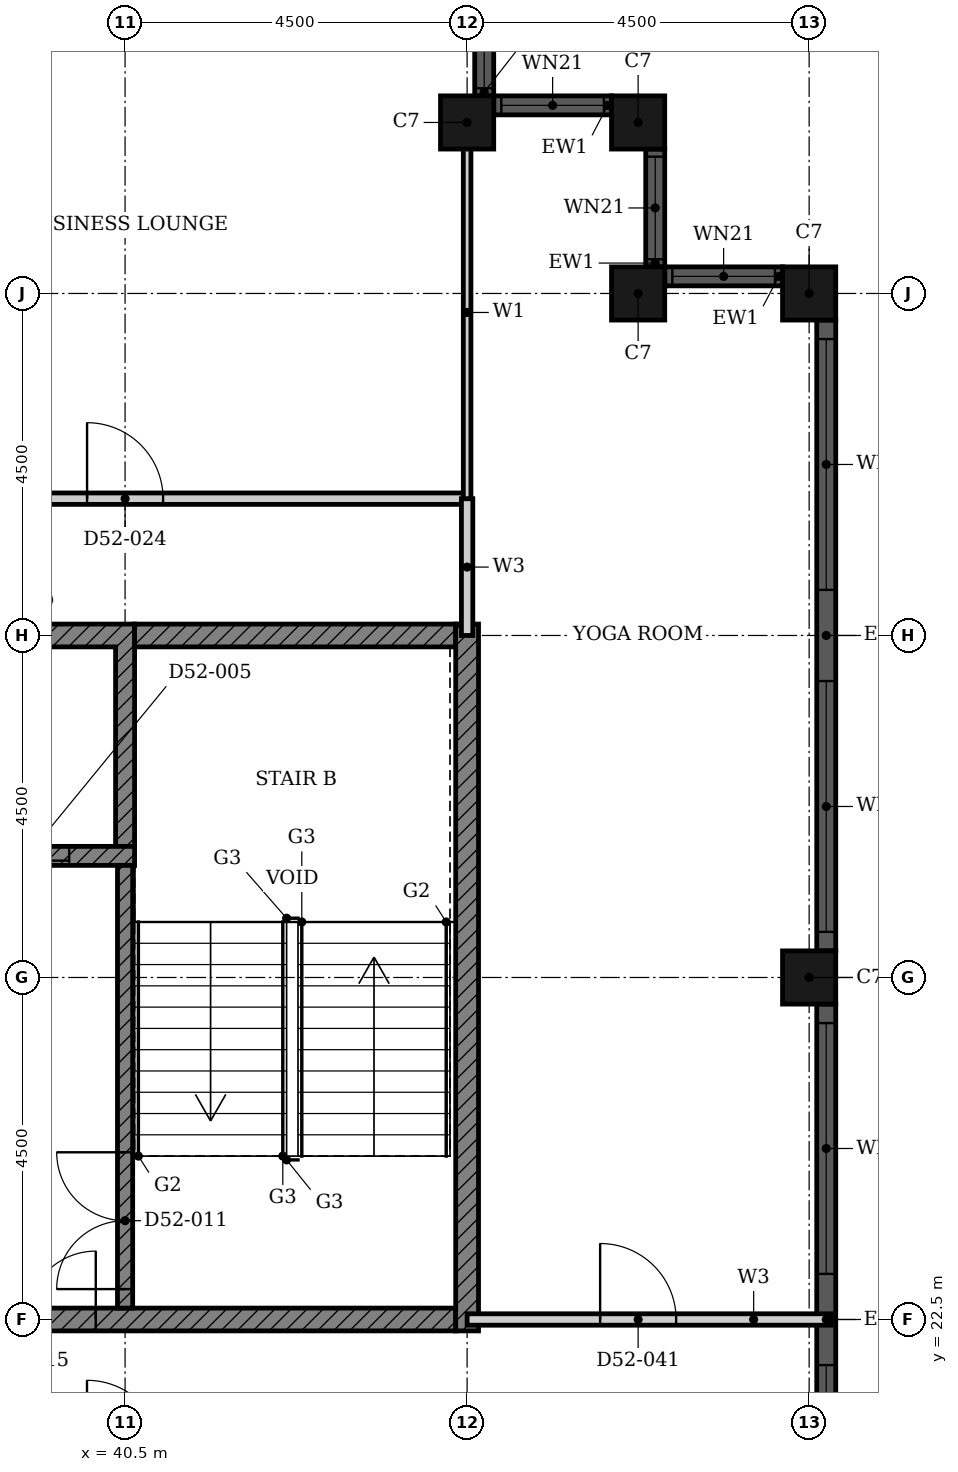
"""IFC4 building model, lengths in metres.
Left out: names, types, materials, properties, quantities, classifications, styles, units other than length and angle.
Written with IfcOpenShell. Run it as: python <this file> out.ifc"""

import sys

from ifc_helpers import new_model, si_unit, direction, frame, frame_2d, origin, origin_2d, place, context, subcontext, project, spatial, polyline, rectangle, hollow_rectangle, outline, extrude, element, fill, save


model = new_model("IFC4")
c1 = context("Model", 3, precision=1e-05, world=origin(), true_north=direction((0.0, 1.0)))
c2 = subcontext(c1, "Body", "Model", "MODEL_VIEW")
j1 = project(units=[si_unit("LENGTHUNIT", "METRE"), si_unit("PLANEANGLEUNIT", "RADIAN")], contexts=[c1])
p1 = place(None, origin())
s1 = spatial("IfcSite", under=j1, at=p1, CompositionType="ELEMENT")
p2 = place(p1, origin())
s2 = spatial("IfcBuilding", under=s1, at=p2, CompositionType="ELEMENT")
p3 = place(p2, frame((0.0, 0.0, 207.2)))
s3 = spatial("IfcBuildingStorey", under=s2, at=p3, CompositionType="ELEMENT", Elevation=207.2)
for number, where, z_axis, x_axis in (
    (1, (49.5, 27.0, 0.0), (0.0, 0.0, 1.0), (1.0, 0.0, 0.0)),
    (2, (49.5, 36.0, 0.0), (0.0, 0.0, 1.0), (1.0, 0.0, 0.0)),
    (3, (47.25, 36.0, 0.0), (0.0, 0.0, 1.0), (1.0, 0.0, 0.0)),
    (4, (47.25, 38.25, 0.0), (0.0, 0.0, 1.0), (1.0, 0.0, 0.0)),
    (5, (45.0, 38.25, 0.0), (0.0, 0.0, 1.0), (1.0, 0.0, 0.0)),
):
    element("IfcColumn", number, at=place(p3, frame(where, z_axis=z_axis, x_axis=x_axis)), inside=s3, PredefinedType="COLUMN", context=c2, shape_type="SweptSolid", body=[
        extrude(hollow_rectangle(XDim=0.7, YDim=0.7, WallThickness=0.022, at=origin_2d()), origin(), (0.0, 0.0, 1.0), 3.7),
    ])
p4 = place(p3, frame((49.725, 18.35, 0.0), z_axis=(0.0, 0.0, 1.0), x_axis=(0.0, 1.0, 0.0)))
e6 = element("IfcWall", 6, at=p4, inside=s3, PredefinedType="SOLIDWALL", context=c2, shape_type="SweptSolid", body=[
    extrude(rectangle(XDim=8.3, YDim=0.25, at=frame_2d((4.15, 0.0))), origin(), (0.0, 0.0, 1.0), 3.7),
])
p5 = place(p4, frame((0.25, 0.0, 0.45)))
e7 = element("IfcOpeningElement", 7, at=p5, cuts=e6, PredefinedType="OPENING", context=c2, shape_type="SweptSolid", body=[
    extrude(rectangle(XDim=3.3, YDim=2.3, at=frame_2d((1.65, 1.15))), frame((0.0, 0.135, 0.0), z_axis=(0.0, -1.0, 0.0), x_axis=(1.0, 0.0, 0.0)), (0.0, 0.0, 1.0), 0.27),
])
p6 = place(p4, frame((4.75, 0.0, 0.45)))
e8 = element("IfcOpeningElement", 8, at=p6, cuts=e6, PredefinedType="OPENING", context=c2, shape_type="SweptSolid", body=[
    extrude(rectangle(XDim=3.3, YDim=2.3, at=frame_2d((1.65, 1.15))), frame((0.0, 0.135, 0.0), z_axis=(0.0, -1.0, 0.0), x_axis=(1.0, 0.0, 0.0)), (0.0, 0.0, 1.0), 0.27),
])
p7 = place(p3, frame((49.725, 27.35, 0.0), z_axis=(0.0, 0.0, 1.0), x_axis=(0.0, 1.0, 0.0)))
e9 = element("IfcWall", 9, at=p7, inside=s3, PredefinedType="SOLIDWALL", context=c2, shape_type="SweptSolid", body=[
    extrude(rectangle(XDim=8.3, YDim=0.25, at=frame_2d((4.15, 0.0))), origin(), (0.0, 0.0, 1.0), 3.7),
])
p8 = place(p7, frame((0.25, 0.0, 0.45)))
e10 = element("IfcOpeningElement", 10, at=p8, cuts=e9, PredefinedType="OPENING", context=c2, shape_type="SweptSolid", body=[
    extrude(rectangle(XDim=3.3, YDim=2.3, at=frame_2d((1.65, 1.15))), frame((0.0, 0.135, 0.0), z_axis=(0.0, -1.0, 0.0), x_axis=(1.0, 0.0, 0.0)), (0.0, 0.0, 1.0), 0.27),
])
p9 = place(p7, frame((4.75, 0.0, 0.45)))
e11 = element("IfcOpeningElement", 11, at=p9, cuts=e9, PredefinedType="OPENING", context=c2, shape_type="SweptSolid", body=[
    extrude(rectangle(XDim=3.3, YDim=2.3, at=frame_2d((1.65, 1.15))), frame((0.0, 0.135, 0.0), z_axis=(0.0, -1.0, 0.0), x_axis=(1.0, 0.0, 0.0)), (0.0, 0.0, 1.0), 0.27),
])
p10 = place(p3, frame((49.15, 36.225, 0.0), z_axis=(0.0, 0.0, 1.0), x_axis=(-1.0, 0.0, 0.0)))
e12 = element("IfcWall", 12, at=p10, inside=s3, PredefinedType="SOLIDWALL", context=c2, shape_type="SweptSolid", body=[
    extrude(rectangle(XDim=1.55, YDim=0.25, at=frame_2d((0.775, 0.0))), origin(), (0.0, 0.0, 1.0), 3.7),
])
p11 = place(p10, frame((0.1, 0.0, 0.9)))
e13 = element("IfcOpeningElement", 13, at=p11, cuts=e12, PredefinedType="OPENING", context=c2, shape_type="SweptSolid", body=[
    extrude(rectangle(XDim=1.35, YDim=1.85, at=frame_2d((0.675, 0.925))), frame((0.0, 0.135, 0.0), z_axis=(0.0, -1.0, 0.0), x_axis=(1.0, 0.0, 0.0)), (0.0, 0.0, 1.0), 0.27),
])
p12 = place(p3, frame((47.475, 36.35, 0.0), z_axis=(0.0, 0.0, 1.0), x_axis=(0.0, 1.0, 0.0)))
e14 = element("IfcWall", 14, at=p12, inside=s3, PredefinedType="SOLIDWALL", context=c2, shape_type="SweptSolid", body=[
    extrude(rectangle(XDim=1.55, YDim=0.25, at=frame_2d((0.775, 0.0))), origin(), (0.0, 0.0, 1.0), 3.7),
])
p13 = place(p12, frame((0.1, 0.0, 0.9)))
e15 = element("IfcOpeningElement", 15, at=p13, cuts=e14, PredefinedType="OPENING", context=c2, shape_type="SweptSolid", body=[
    extrude(rectangle(XDim=1.35, YDim=1.85, at=frame_2d((0.675, 0.925))), frame((0.0, 0.135, 0.0), z_axis=(0.0, -1.0, 0.0), x_axis=(1.0, 0.0, 0.0)), (0.0, 0.0, 1.0), 0.27),
])
p14 = place(p3, frame((46.9, 38.475, 0.0), z_axis=(0.0, 0.0, 1.0), x_axis=(-1.0, 0.0, 0.0)))
e16 = element("IfcWall", 16, at=p14, inside=s3, PredefinedType="SOLIDWALL", context=c2, shape_type="SweptSolid", body=[
    extrude(rectangle(XDim=1.55, YDim=0.25, at=frame_2d((0.775, 0.0))), origin(), (0.0, 0.0, 1.0), 3.7),
])
p15 = place(p14, frame((0.1, 0.0, 0.9)))
e17 = element("IfcOpeningElement", 17, at=p15, cuts=e16, PredefinedType="OPENING", context=c2, shape_type="SweptSolid", body=[
    extrude(rectangle(XDim=1.35, YDim=1.85, at=frame_2d((0.675, 0.925))), frame((0.0, 0.135, 0.0), z_axis=(0.0, -1.0, 0.0), x_axis=(1.0, 0.0, 0.0)), (0.0, 0.0, 1.0), 0.27),
])
p16 = place(p3, frame((45.225, 38.6, 0.0), z_axis=(0.0, 0.0, 1.0), x_axis=(0.0, 1.0, 0.0)))
e18 = element("IfcWall", 18, at=p16, inside=s3, PredefinedType="SOLIDWALL", context=c2, shape_type="SweptSolid", body=[
    extrude(rectangle(XDim=1.55, YDim=0.25, at=frame_2d((0.775, 0.0))), origin(), (0.0, 0.0, 1.0), 3.7),
])
p17 = place(p16, frame((0.1, 0.0, 0.9)))
e19 = element("IfcOpeningElement", 19, at=p17, cuts=e18, PredefinedType="OPENING", context=c2, shape_type="SweptSolid", body=[
    extrude(rectangle(XDim=1.35, YDim=1.85, at=frame_2d((0.675, 0.925))), frame((0.0, 0.135, 0.0), z_axis=(0.0, -1.0, 0.0), x_axis=(1.0, 0.0, 0.0)), (0.0, 0.0, 1.0), 0.27),
])
p18 = place(p3, origin())
e20 = element("IfcWall", 20, at=p18, inside=s3, PredefinedType="SHEAR", context=c2, shape_type="SweptSolid", body=[
    extrude(outline(polyline([(35.232, 28.725), (35.482, 28.725), (35.482, 31.35), (37.803, 31.35), (37.803, 28.725), (38.053, 28.725), (38.053, 31.35), (40.375, 31.35), (40.375, 28.725), (40.625, 28.725), (40.625, 31.65), (35.232, 31.65), (35.232, 28.725)])), origin(), (0.0, 0.0, 1.0), 3.4),
])
p19 = place(p3, frame((32.911, 22.5, 0.0), z_axis=(0.0, 0.0, 1.0), x_axis=(1.0, 0.0, 0.0)))
e21 = element("IfcWall", 21, at=p19, inside=s3, PredefinedType="SHEAR", context=c2, shape_type="SweptSolid", body=[
    extrude(rectangle(XDim=11.939, YDim=0.3, at=frame_2d((5.97, 0.0))), origin(), (0.0, 0.0, 1.0), 3.4),
])
p20 = place(p19, frame((5.404, 0.0, 0.0)))
e22 = element("IfcOpeningElement", 22, at=p20, cuts=e21, PredefinedType="OPENING", context=c2, shape_type="SweptSolid", body=[
    extrude(rectangle(XDim=1.8, YDim=2.1, at=frame_2d((0.9, 1.05))), frame((0.0, 0.16, 0.0), z_axis=(0.0, -1.0, 0.0), x_axis=(1.0, 0.0, 0.0)), (0.0, 0.0, 1.0), 0.32),
])
p21 = place(p3, frame((40.625, 31.5, 0.0), z_axis=(0.0, 0.0, 1.0), x_axis=(1.0, 0.0, 0.0)))
e23 = element("IfcWall", 23, at=p21, inside=s3, PredefinedType="SHEAR", context=c2, shape_type="SweptSolid", body=[
    extrude(rectangle(XDim=4.225, YDim=0.3, at=frame_2d((2.113, 0.0))), origin(), (0.0, 0.0, 1.0), 3.4),
])
p22 = place(p3, frame((45.0, 22.35, 0.0), z_axis=(0.0, 0.0, 1.0), x_axis=(0.0, 1.0, 0.0)))
e24 = element("IfcWall", 24, at=p22, inside=s3, PredefinedType="SHEAR", context=c2, shape_type="SweptSolid", body=[
    extrude(rectangle(XDim=9.3, YDim=0.3, at=frame_2d((4.65, 0.0))), origin(), (0.0, 0.0, 1.0), 3.4),
])
p23 = place(p3, frame((24.947, 28.6, 0.0), z_axis=(0.0, 0.0, 1.0), x_axis=(1.0, 0.0, 0.0)))
e25 = element("IfcWall", 25, at=p23, inside=s3, PredefinedType="SHEAR", context=c2, shape_type="SweptSolid", body=[
    extrude(rectangle(XDim=15.678, YDim=0.25, at=frame_2d((7.839, 0.0))), origin(), (0.0, 0.0, 1.0), 3.4),
])
p24 = place(p23, frame((6.004, 0.0, 0.0)))
e26 = element("IfcOpeningElement", 26, at=p24, cuts=e25, PredefinedType="OPENING", context=c2, shape_type="SweptSolid", body=[
    extrude(rectangle(XDim=1.1, YDim=2.1, at=frame_2d((0.55, 1.05))), frame((0.0, 0.135, 0.0), z_axis=(0.0, -1.0, 0.0), x_axis=(1.0, 0.0, 0.0)), (0.0, 0.0, 1.0), 0.27),
])
p25 = place(p23, frame((11.146, 0.0, 0.0)))
e27 = element("IfcOpeningElement", 27, at=p25, cuts=e25, PredefinedType="OPENING", context=c2, shape_type="SweptSolid", body=[
    extrude(rectangle(XDim=1.1, YDim=2.1, at=frame_2d((0.55, 1.05))), frame((0.0, 0.135, 0.0), z_axis=(0.0, -1.0, 0.0), x_axis=(1.0, 0.0, 0.0)), (0.0, 0.0, 1.0), 0.27),
])
p26 = place(p23, frame((13.718, 0.0, 0.0)))
e28 = element("IfcOpeningElement", 28, at=p26, cuts=e25, PredefinedType="OPENING", context=c2, shape_type="SweptSolid", body=[
    extrude(rectangle(XDim=1.1, YDim=2.1, at=frame_2d((0.55, 1.05))), frame((0.0, 0.135, 0.0), z_axis=(0.0, -1.0, 0.0), x_axis=(1.0, 0.0, 0.0)), (0.0, 0.0, 1.0), 0.27),
])
p27 = place(p23, frame((0.961, 0.0, 0.0)))
e29 = element("IfcOpeningElement", 29, at=p27, cuts=e25, PredefinedType="OPENING", context=c2, shape_type="SweptSolid", body=[
    extrude(rectangle(XDim=0.9, YDim=2.1, at=frame_2d((0.45, 1.05))), frame((0.0, 0.135, 0.0), z_axis=(0.0, -1.0, 0.0), x_axis=(1.0, 0.0, 0.0)), (0.0, 0.0, 1.0), 0.27),
])
p28 = place(p23, frame((8.675, 0.0, 0.0)))
e30 = element("IfcOpeningElement", 30, at=p28, cuts=e25, PredefinedType="OPENING", context=c2, shape_type="SweptSolid", body=[
    extrude(rectangle(XDim=0.9, YDim=2.1, at=frame_2d((0.45, 1.05))), frame((0.0, 0.135, 0.0), z_axis=(0.0, -1.0, 0.0), x_axis=(1.0, 0.0, 0.0)), (0.0, 0.0, 1.0), 0.27),
])
p29 = place(p3, frame((40.5, 22.65, 0.0), z_axis=(0.0, 0.0, 1.0), x_axis=(0.0, 1.0, 0.0)))
e31 = element("IfcWall", 31, at=p29, inside=s3, PredefinedType="SHEAR", context=c2, shape_type="SweptSolid", body=[
    extrude(rectangle(XDim=5.825, YDim=0.2, at=frame_2d((2.913, 0.0))), origin(), (0.0, 0.0, 1.0), 3.4),
])
p30 = place(p29, frame((0.25, 0.0, 0.0)))
e32 = element("IfcOpeningElement", 32, at=p30, cuts=e31, PredefinedType="OPENING", context=c2, shape_type="SweptSolid", body=[
    extrude(rectangle(XDim=1.8, YDim=2.1, at=frame_2d((0.9, 1.05))), frame((0.0, 0.11, 0.0), z_axis=(0.0, -1.0, 0.0), x_axis=(1.0, 0.0, 0.0)), (0.0, 0.0, 1.0), 0.22),
])
p31 = place(p3, frame((45.0, 22.5, 0.0), z_axis=(0.0, 0.0, 1.0), x_axis=(1.0, 0.0, 0.0)))
e33 = element("IfcWall", 33, at=p31, inside=s3, PredefinedType="PARTITIONING", context=c2, shape_type="SweptSolid", body=[
    extrude(rectangle(XDim=4.79, YDim=0.15, at=frame_2d((2.395, 0.0))), origin(), (0.0, 0.0, 1.0), 3.4),
])
p32 = place(p31, frame((1.75, 0.0, 0.0)))
e34 = element("IfcOpeningElement", 34, at=p32, cuts=e33, PredefinedType="OPENING", context=c2, shape_type="SweptSolid", body=[
    extrude(rectangle(XDim=1.0, YDim=2.1, at=frame_2d((0.5, 1.05))), frame((0.0, 0.085, 0.0), z_axis=(0.0, -1.0, 0.0), x_axis=(1.0, 0.0, 0.0)), (0.0, 0.0, 1.0), 0.17),
])
p33 = place(p3, frame((36.0, 33.3, 0.0), z_axis=(0.0, 0.0, 1.0), x_axis=(1.0, 0.0, 0.0)))
e35 = element("IfcWall", 35, at=p33, inside=s3, PredefinedType="PARTITIONING", context=c2, shape_type="SweptSolid", body=[
    extrude(rectangle(XDim=9.0, YDim=0.15, at=frame_2d((4.5, 0.0))), origin(), (0.0, 0.0, 1.0), 3.4),
])
p34 = place(p33, frame((4.0, 0.0, 0.0)))
e36 = element("IfcOpeningElement", 36, at=p34, cuts=e35, PredefinedType="OPENING", context=c2, shape_type="SweptSolid", body=[
    extrude(rectangle(XDim=1.0, YDim=2.1, at=frame_2d((0.5, 1.05))), frame((0.0, 0.085, 0.0), z_axis=(0.0, -1.0, 0.0), x_axis=(1.0, 0.0, 0.0)), (0.0, 0.0, 1.0), 0.17),
])
p35 = place(p3, frame((45.0, 31.5, 0.0), z_axis=(0.0, 0.0, 1.0), x_axis=(0.0, 1.0, 0.0)))
e37 = element("IfcWall", 37, at=p35, inside=s3, PredefinedType="PARTITIONING", context=c2, shape_type="SweptSolid", body=[
    extrude(rectangle(XDim=1.8, YDim=0.15, at=frame_2d((0.9, 0.0))), origin(), (0.0, 0.0, 1.0), 3.4),
])
p36 = place(p3, frame((45.0, 33.3, 0.0), z_axis=(0.0, 0.0, 1.0), x_axis=(0.0, 1.0, 0.0)))
e38 = element("IfcWall", 38, at=p36, inside=s3, PredefinedType="PARTITIONING", context=c2, shape_type="SweptSolid", body=[
    extrude(rectangle(XDim=4.9, YDim=0.1, at=frame_2d((2.45, 0.0))), origin(), (0.0, 0.0, 1.0), 3.4),
])
p37 = place(p5, origin())
e39 = element("IfcWindow", 39, at=p37, inside=s3, PartitioningType="SINGLE_PANEL", PredefinedType="WINDOW", context=c2, shape_type="SweptSolid", body=[
    extrude(rectangle(XDim=3.3, YDim=2.3, at=frame_2d((1.65, 1.15))), frame((0.0, 0.03, 0.0), z_axis=(0.0, -1.0, 0.0), x_axis=(1.0, 0.0, 0.0)), (0.0, 0.0, 1.0), 0.06),
])
fill(e7, e39)
p38 = place(p6, origin())
e40 = element("IfcWindow", 40, at=p38, inside=s3, PartitioningType="SINGLE_PANEL", PredefinedType="WINDOW", context=c2, shape_type="SweptSolid", body=[
    extrude(rectangle(XDim=3.3, YDim=2.3, at=frame_2d((1.65, 1.15))), frame((0.0, 0.03, 0.0), z_axis=(0.0, -1.0, 0.0), x_axis=(1.0, 0.0, 0.0)), (0.0, 0.0, 1.0), 0.06),
])
fill(e8, e40)
p39 = place(p8, origin())
e41 = element("IfcWindow", 41, at=p39, inside=s3, PartitioningType="SINGLE_PANEL", PredefinedType="WINDOW", context=c2, shape_type="SweptSolid", body=[
    extrude(rectangle(XDim=3.3, YDim=2.3, at=frame_2d((1.65, 1.15))), frame((0.0, 0.03, 0.0), z_axis=(0.0, -1.0, 0.0), x_axis=(1.0, 0.0, 0.0)), (0.0, 0.0, 1.0), 0.06),
])
fill(e10, e41)
p40 = place(p9, origin())
e42 = element("IfcWindow", 42, at=p40, inside=s3, PartitioningType="SINGLE_PANEL", PredefinedType="WINDOW", context=c2, shape_type="SweptSolid", body=[
    extrude(rectangle(XDim=3.3, YDim=2.3, at=frame_2d((1.65, 1.15))), frame((0.0, 0.03, 0.0), z_axis=(0.0, -1.0, 0.0), x_axis=(1.0, 0.0, 0.0)), (0.0, 0.0, 1.0), 0.06),
])
fill(e11, e42)
p41 = place(p11, origin())
e43 = element("IfcWindow", 43, at=p41, inside=s3, PartitioningType="SINGLE_PANEL", PredefinedType="WINDOW", context=c2, shape_type="SweptSolid", body=[
    extrude(rectangle(XDim=1.35, YDim=1.85, at=frame_2d((0.675, 0.925))), frame((0.0, 0.03, 0.0), z_axis=(0.0, -1.0, 0.0), x_axis=(1.0, 0.0, 0.0)), (0.0, 0.0, 1.0), 0.06),
])
fill(e13, e43)
p42 = place(p13, origin())
e44 = element("IfcWindow", 44, at=p42, inside=s3, PartitioningType="SINGLE_PANEL", PredefinedType="WINDOW", context=c2, shape_type="SweptSolid", body=[
    extrude(rectangle(XDim=1.35, YDim=1.85, at=frame_2d((0.675, 0.925))), frame((0.0, 0.03, 0.0), z_axis=(0.0, -1.0, 0.0), x_axis=(1.0, 0.0, 0.0)), (0.0, 0.0, 1.0), 0.06),
])
fill(e15, e44)
p43 = place(p15, origin())
e45 = element("IfcWindow", 45, at=p43, inside=s3, PartitioningType="SINGLE_PANEL", PredefinedType="WINDOW", context=c2, shape_type="SweptSolid", body=[
    extrude(rectangle(XDim=1.35, YDim=1.85, at=frame_2d((0.675, 0.925))), frame((0.0, 0.03, 0.0), z_axis=(0.0, -1.0, 0.0), x_axis=(1.0, 0.0, 0.0)), (0.0, 0.0, 1.0), 0.06),
])
fill(e17, e45)
p44 = place(p17, origin())
e46 = element("IfcWindow", 46, at=p44, inside=s3, PartitioningType="SINGLE_PANEL", PredefinedType="WINDOW", context=c2, shape_type="SweptSolid", body=[
    extrude(rectangle(XDim=1.35, YDim=1.85, at=frame_2d((0.675, 0.925))), frame((0.0, 0.03, 0.0), z_axis=(0.0, -1.0, 0.0), x_axis=(1.0, 0.0, 0.0)), (0.0, 0.0, 1.0), 0.06),
])
fill(e19, e46)
p45 = place(p26, origin())
e47 = element("IfcDoor", 47, at=p45, inside=s3, OperationType="DOUBLE_DOOR_SLIDING", PredefinedType="DOOR", context=c2, shape_type="SweptSolid", body=[
    extrude(rectangle(XDim=1.1, YDim=2.1, at=frame_2d((0.55, 1.05))), frame((0.0, 0.025, 0.0), z_axis=(0.0, -1.0, 0.0), x_axis=(1.0, 0.0, 0.0)), (0.0, 0.0, 1.0), 0.05),
])
fill(e28, e47)
p46 = place(p30, origin())
e48 = element("IfcDoor", 48, at=p46, inside=s3, OperationType="DOUBLE_DOOR_SINGLE_SWING", PredefinedType="DOOR", context=c2, shape_type="SweptSolid", body=[
    extrude(rectangle(XDim=1.8, YDim=2.1, at=frame_2d((0.9, 1.05))), frame((0.0, 0.025, 0.0), z_axis=(0.0, -1.0, 0.0), x_axis=(1.0, 0.0, 0.0)), (0.0, 0.0, 1.0), 0.05),
])
fill(e32, e48)
p47 = place(p20, origin())
e49 = element("IfcDoor", 49, at=p47, inside=s3, OperationType="DOUBLE_DOOR_SINGLE_SWING", PredefinedType="DOOR", context=c2, shape_type="SweptSolid", body=[
    extrude(rectangle(XDim=1.8, YDim=2.1, at=frame_2d((0.9, 1.05))), frame((0.0, 0.025, 0.0), z_axis=(0.0, -1.0, 0.0), x_axis=(1.0, 0.0, 0.0)), (0.0, 0.0, 1.0), 0.05),
])
fill(e22, e49)
p48 = place(p34, origin())
e50 = element("IfcDoor", 50, at=p48, inside=s3, OperationType="SINGLE_SWING_RIGHT", PredefinedType="DOOR", context=c2, shape_type="SweptSolid", body=[
    extrude(rectangle(XDim=1.0, YDim=2.1, at=frame_2d((0.5, 1.05))), frame((0.0, 0.025, 0.0), z_axis=(0.0, -1.0, 0.0), x_axis=(1.0, 0.0, 0.0)), (0.0, 0.0, 1.0), 0.05),
])
fill(e36, e50)
p49 = place(p32, origin())
e51 = element("IfcDoor", 51, at=p49, inside=s3, OperationType="SINGLE_SWING_LEFT", PredefinedType="DOOR", context=c2, shape_type="SweptSolid", body=[
    extrude(rectangle(XDim=1.0, YDim=2.1, at=frame_2d((0.5, 1.05))), frame((0.0, 0.025, 0.0), z_axis=(0.0, -1.0, 0.0), x_axis=(1.0, 0.0, 0.0)), (0.0, 0.0, 1.0), 0.05),
])
fill(e34, e51)
save(model, sys.argv[1])
